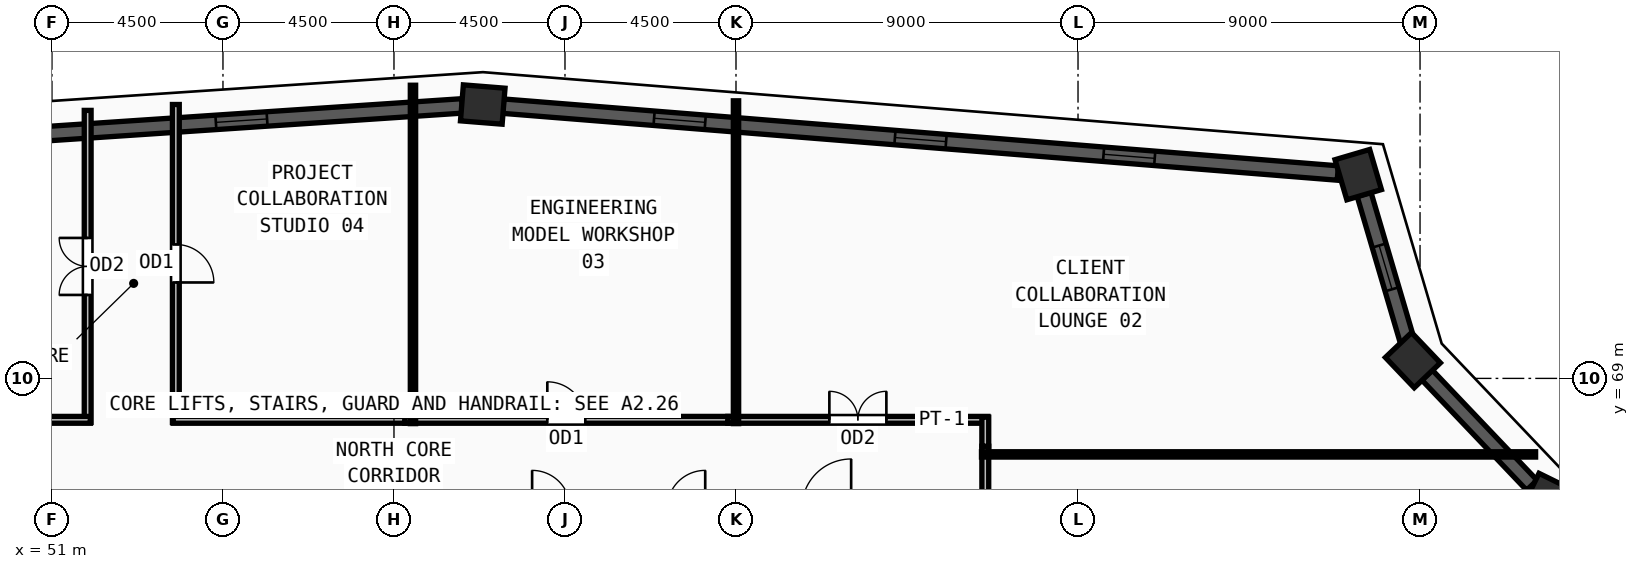
"""IFC4 building model, lengths in metres.
Left out: names, types, materials, properties, quantities, classifications, styles, units other than length and angle.
Written with IfcOpenShell. Run it as: python <this file> out.ifc"""

import sys

from ifc_helpers import new_model, si_unit, direction, frame, frame_2d, origin, origin_2d, place, context, subcontext, project, spatial, rectangle, extrude, source, transform, mapped, element, fill, save


model = new_model("IFC4")
c1 = context("Model", 3, precision=1e-05, world=origin(), true_north=direction((0.0, 1.0)))
c2 = subcontext(c1, "Body", "Model", "MODEL_VIEW")
j1 = project(units=[si_unit("LENGTHUNIT", "METRE"), si_unit("PLANEANGLEUNIT", "RADIAN")], contexts=[c1])
p1 = place(None, origin())
s1 = spatial("IfcSite", under=j1, at=p1, CompositionType="ELEMENT")
p2 = place(p1, origin())
s2 = spatial("IfcBuilding", under=s1, at=p2, CompositionType="ELEMENT")
p3 = place(p2, frame((0.0, 0.0, 297.75)))
s3 = spatial("IfcBuildingStorey", under=s2, at=p3, CompositionType="ELEMENT", Elevation=297.75)
m1 = source(origin(), c2, "Body", "SweptSolid", [
    extrude(rectangle(XDim=1.1, YDim=0.95, at=origin_2d()), origin(), (0.0, 0.0, 1.0), 3.75),
])
for number, where, z_axis, x_axis in (
    (1, (62.336, 76.206, 0.0), (0.0, 0.0, 1.0), (-0.997, 0.08, 0.0)),
    (2, (85.374, 74.361, 0.0), (0.0, 0.0, 1.0), (-0.283, 0.959, 0.0)),
    (3, (86.812, 69.48, 0.0), (0.0, 0.0, 1.0), (-0.689, 0.724, 0.0)),
    (4, (90.314, 65.799, 0.0), (0.0, 0.0, 1.0), (0.441, 0.897, 0.0)),
):
    element("IfcColumn", number, at=place(p3, frame(where, z_axis=z_axis, x_axis=x_axis)), inside=s3, PredefinedType="COLUMN", context=c2, shape_type="MappedRepresentation", body=[
        mapped(m1, transform((0.0, 0.0, 0.0), x_axis=(1.0, 0.0, 0.0), y_axis=(0.0, 1.0, 0.0), z_axis=(0.0, 0.0, 1.0), scale=1.0)),
    ])
p4 = place(p3, frame((89.942, 66.19, 0.0), z_axis=(0.0, 0.0, 1.0), x_axis=(-0.689222359841, 0.724549886961, 0.0)))
e5 = element("IfcWall", 5, at=p4, inside=s3, PredefinedType="SOLIDWALL", context=c2, shape_type="SweptSolid", body=[
    extrude(rectangle(XDim=4.001, YDim=0.38, at=frame_2d((2.0, 0.0))), origin(), (0.0, 0.0, 1.0), 3.57),
])
p5 = place(p3, frame((86.659, 69.998, 0.0), z_axis=(0.0, 0.0, 1.0), x_axis=(-0.2823872674, 0.959300490571, 0.0)))
e6 = element("IfcWall", 6, at=p5, inside=s3, PredefinedType="SOLIDWALL", context=c2, shape_type="SweptSolid", body=[
    extrude(rectangle(XDim=4.008, YDim=0.38, at=frame_2d((2.004, 0.0))), origin(), (0.0, 0.0, 1.0), 3.57),
])
m2 = source(origin(), c2, "Body", "SweptSolid", [
    extrude(rectangle(XDim=1.2, YDim=1.9, at=frame_2d((0.6, 0.95))), frame((0.0, 0.2, 0.0), z_axis=(0.0, -1.0, 0.0), x_axis=(1.0, 0.0, 0.0)), (0.0, 0.0, 1.0), 0.4),
])
p6 = place(p5, frame((1.404, 0.0, 0.55)))
e7 = element("IfcOpeningElement", 7, at=p6, cuts=e6, PredefinedType="OPENING", context=c2, shape_type="MappedRepresentation", body=[
    mapped(m2, transform((0.0, 0.0, 0.0), x_axis=(1.0, 0.0, 0.0), y_axis=(0.0, 1.0, 0.0), z_axis=(0.0, 0.0, 1.0), scale=1.0)),
])
p7 = place(p3, frame((84.836, 74.404, 0.0), z_axis=(0.0, 0.0, 1.0), x_axis=(-0.996807769303, 0.079839032169, 0.0)))
e8 = element("IfcWall", 8, at=p7, inside=s3, PredefinedType="SOLIDWALL", context=c2, shape_type="SweptSolid", body=[
    extrude(rectangle(XDim=22.032, YDim=0.38, at=frame_2d((11.016, 0.0))), origin(), (0.0, 0.0, 1.0), 3.57),
])
m3 = source(origin(), c2, "Body", "SweptSolid", [
    extrude(rectangle(XDim=1.35, YDim=1.85, at=frame_2d((0.675, 0.925))), frame((0.0, 0.2, 0.0), z_axis=(0.0, -1.0, 0.0), x_axis=(1.0, 0.0, 0.0)), (0.0, 0.0, 1.0), 0.4),
])
p8 = place(p7, frame((4.833, 0.0, 0.55)))
e9 = element("IfcOpeningElement", 9, at=p8, cuts=e8, PredefinedType="OPENING", context=c2, shape_type="MappedRepresentation", body=[
    mapped(m3, transform((0.0, 0.0, 0.0), x_axis=(1.0, 0.0, 0.0), y_axis=(0.0, 1.0, 0.0), z_axis=(0.0, 0.0, 1.0), scale=1.0)),
])
p9 = place(p7, frame((10.341, 0.0, 0.55)))
e10 = element("IfcOpeningElement", 10, at=p9, cuts=e8, PredefinedType="OPENING", context=c2, shape_type="MappedRepresentation", body=[
    mapped(m3, transform((0.0, 0.0, 0.0), x_axis=(1.0, 0.0, 0.0), y_axis=(0.0, 1.0, 0.0), z_axis=(0.0, 0.0, 1.0), scale=1.0)),
])
p10 = place(p7, frame((16.699, 0.0, 0.55)))
e11 = element("IfcOpeningElement", 11, at=p10, cuts=e8, PredefinedType="OPENING", context=c2, shape_type="MappedRepresentation", body=[
    mapped(m3, transform((0.0, 0.0, 0.0), x_axis=(1.0, 0.0, 0.0), y_axis=(0.0, 1.0, 0.0), z_axis=(0.0, 0.0, 1.0), scale=1.0)),
])
p11 = place(p3, frame((61.797, 76.17, 0.0), z_axis=(0.0, 0.0, 1.0), x_axis=(-0.99777170169, -0.066720546358, 0.0)))
e12 = element("IfcWall", 12, at=p11, inside=s3, PredefinedType="SOLIDWALL", context=c2, shape_type="SweptSolid", body=[
    extrude(rectangle(XDim=26.694, YDim=0.38, at=frame_2d((13.347, 0.0))), origin(), (0.0, 0.0, 1.0), 3.57),
])
p12 = place(p11, frame((5.148, 0.0, 0.55)))
e13 = element("IfcOpeningElement", 13, at=p12, cuts=e12, PredefinedType="OPENING", context=c2, shape_type="MappedRepresentation", body=[
    mapped(m3, transform((0.0, 0.0, 0.0), x_axis=(1.0, 0.0, 0.0), y_axis=(0.0, 1.0, 0.0), z_axis=(0.0, 0.0, 1.0), scale=1.0)),
])
p13 = place(p11, frame((12.672, 0.0, 0.55)))
e14 = element("IfcOpeningElement", 14, at=p13, cuts=e12, PredefinedType="OPENING", context=c2, shape_type="MappedRepresentation", body=[
    mapped(m3, transform((0.0, 0.0, 0.0), x_axis=(1.0, 0.0, 0.0), y_axis=(0.0, 1.0, 0.0), z_axis=(0.0, 0.0, 1.0), scale=1.0)),
])
p14 = place(p11, frame((19.345, 0.0, 0.55)))
e15 = element("IfcOpeningElement", 15, at=p14, cuts=e12, PredefinedType="OPENING", context=c2, shape_type="MappedRepresentation", body=[
    mapped(m3, transform((0.0, 0.0, 0.0), x_axis=(1.0, 0.0, 0.0), y_axis=(0.0, 1.0, 0.0), z_axis=(0.0, 0.0, 1.0), scale=1.0)),
])
p15 = place(p3, frame((68.785, 67.91, 0.0), z_axis=(0.0, 0.0, 1.0), x_axis=(1.0, 0.0, 0.0)))
e16 = element("IfcWall", 16, at=p15, inside=s3, PredefinedType="PARTITIONING", context=c2, shape_type="SweptSolid", body=[
    extrude(rectangle(XDim=6.845, YDim=0.18, at=frame_2d((3.422, 0.0))), origin(), (0.0, 0.0, 1.0), 3.57),
])
m4 = source(origin(), c2, "Body", "SweptSolid", [
    extrude(rectangle(XDim=1.5, YDim=2.2, at=frame_2d((0.75, 1.1))), frame((0.0, 0.1, 0.0), z_axis=(0.0, -1.0, 0.0), x_axis=(1.0, 0.0, 0.0)), (0.0, 0.0, 1.0), 0.2),
])
p16 = place(p15, frame((2.672, 0.0, 0.0)))
e17 = element("IfcOpeningElement", 17, at=p16, cuts=e16, PredefinedType="OPENING", context=c2, shape_type="MappedRepresentation", body=[
    mapped(m4, transform((0.0, 0.0, 0.0), x_axis=(1.0, 0.0, 0.0), y_axis=(0.0, 1.0, 0.0), z_axis=(0.0, 0.0, 1.0), scale=1.0)),
])
p17 = place(p3, frame((60.285, 67.91, 0.0), z_axis=(0.0, 0.0, 1.0), x_axis=(1.0, 0.0, 0.0)))
e18 = element("IfcWall", 18, at=p17, inside=s3, PredefinedType="PARTITIONING", context=c2, shape_type="SweptSolid", body=[
    extrude(rectangle(XDim=8.5, YDim=0.18, at=frame_2d((4.25, 0.0))), origin(), (0.0, 0.0, 1.0), 3.261),
])
m5 = source(origin(), c2, "Body", "SweptSolid", [
    extrude(rectangle(XDim=1.0, YDim=2.2, at=frame_2d((0.5, 1.1))), frame((0.0, 0.1, 0.0), z_axis=(0.0, -1.0, 0.0), x_axis=(1.0, 0.0, 0.0)), (0.0, 0.0, 1.0), 0.2),
])
p18 = place(p17, frame((3.75, 0.0, 0.0)))
e19 = element("IfcOpeningElement", 19, at=p18, cuts=e18, PredefinedType="OPENING", context=c2, shape_type="MappedRepresentation", body=[
    mapped(m5, transform((0.0, 0.0, 0.0), x_axis=(1.0, 0.0, 0.0), y_axis=(0.0, 1.0, 0.0), z_axis=(0.0, 0.0, 1.0), scale=1.0)),
])
p19 = place(p3, frame((54.26, 76.207, 0.0), z_axis=(0.0, 0.0, 1.0), x_axis=(0.0, -1.0, 0.0)))
e20 = element("IfcWall", 20, at=p19, inside=s3, PredefinedType="PARTITIONING", context=c2, shape_type="SweptSolid", body=[
    extrude(rectangle(XDim=8.367, YDim=0.18, at=frame_2d((4.184, 0.0))), origin(), (0.0, 0.0, 1.0), 3.57),
])
p20 = place(p19, frame((3.683, 0.0, 0.0)))
e21 = element("IfcOpeningElement", 21, at=p20, cuts=e20, PredefinedType="OPENING", context=c2, shape_type="MappedRepresentation", body=[
    mapped(m5, transform((0.0, 0.0, 0.0), x_axis=(1.0, 0.0, 0.0), y_axis=(0.0, 1.0, 0.0), z_axis=(0.0, 0.0, 1.0), scale=1.0)),
])
p21 = place(p3, frame((51.94, 67.84, 0.0), z_axis=(0.0, 0.0, 1.0), x_axis=(0.0, 1.0, 0.0)))
e22 = element("IfcWall", 22, at=p21, inside=s3, PredefinedType="PARTITIONING", context=c2, shape_type="SweptSolid", body=[
    extrude(rectangle(XDim=8.212, YDim=0.18, at=frame_2d((4.106, 0.0))), origin(), (0.0, 0.0, 1.0), 3.57),
])
p22 = place(p21, frame((3.356, 0.0, 0.0)))
e23 = element("IfcOpeningElement", 23, at=p22, cuts=e22, PredefinedType="OPENING", context=c2, shape_type="MappedRepresentation", body=[
    mapped(m4, transform((0.0, 0.0, 0.0), x_axis=(1.0, 0.0, 0.0), y_axis=(0.0, 1.0, 0.0), z_axis=(0.0, 0.0, 1.0), scale=1.0)),
])
p23 = place(p3, frame((75.56, 67.215, 0.0), z_axis=(0.0, 0.0, 1.0), x_axis=(0.0, -1.0, 0.0)))
e24 = element("IfcWall", 24, at=p23, inside=s3, PredefinedType="PARTITIONING", context=c2, shape_type="SweptSolid", body=[
    extrude(rectangle(XDim=2.235, YDim=0.18, at=frame_2d((1.118, 0.0))), origin(), (0.0, 0.0, 1.0), 3.57),
])
p24 = place(p3, frame((75.56, 67.98, 0.0), z_axis=(0.0, 0.0, 1.0), x_axis=(0.0, -1.0, 0.0)))
e25 = element("IfcWall", 25, at=p24, inside=s3, PredefinedType="PARTITIONING", context=c2, shape_type="SweptSolid", body=[
    extrude(rectangle(XDim=0.765, YDim=0.18, at=frame_2d((0.382, 0.0))), origin(), (0.0, 0.0, 1.0), 3.57),
])
p25 = place(p3, frame((54.19, 67.91, 0.0), z_axis=(0.0, 0.0, 1.0), x_axis=(1.0, 0.0, 0.0)))
e26 = element("IfcWall", 26, at=p25, inside=s3, PredefinedType="PARTITIONING", context=c2, shape_type="SweptSolid", body=[
    extrude(rectangle(XDim=6.095, YDim=0.18, at=frame_2d((3.047, 0.0))), origin(), (0.0, 0.0, 1.0), 3.57),
])
p26 = place(p3, frame((44.37, 67.91, 0.0), z_axis=(0.0, 0.0, 1.0), x_axis=(1.0, 0.0, 0.0)))
e27 = element("IfcWall", 27, at=p26, inside=s3, PredefinedType="PARTITIONING", context=c2, shape_type="SweptSolid", body=[
    extrude(rectangle(XDim=7.64, YDim=0.18, at=frame_2d((3.82, 0.0))), origin(), (0.0, 0.0, 1.0), 3.57),
])
p27 = place(p3, frame((75.46, 67.0, 0.0), z_axis=(0.0, 0.0, 1.0), x_axis=(1.0, 0.0, 0.0)))
e28 = element("IfcWall", 28, at=p27, inside=s3, PredefinedType="PARTITIONING", context=c2, shape_type="SweptSolid", body=[
    extrude(rectangle(XDim=14.581, YDim=0.14, at=frame_2d((7.291, 0.0))), origin(), (0.0, 0.0, 1.0), 3.57),
])
p28 = place(p3, frame((60.5, 67.81, 0.0), z_axis=(0.0, 0.0, 1.0), x_axis=(0.0, 1.0, 0.0)))
e29 = element("IfcWall", 29, at=p28, inside=s3, PredefinedType="PARTITIONING", context=c2, shape_type="SweptSolid", body=[
    extrude(rectangle(XDim=8.904, YDim=0.14, at=frame_2d((4.452, 0.0))), origin(), (0.0, 0.0, 1.0), 3.57),
])
p29 = place(p3, frame((69.0, 67.81, 0.0), z_axis=(0.0, 0.0, 1.0), x_axis=(0.0, 1.0, 0.0)))
e30 = element("IfcWall", 30, at=p29, inside=s3, PredefinedType="PARTITIONING", context=c2, shape_type="SweptSolid", body=[
    extrude(rectangle(XDim=8.494, YDim=0.14, at=frame_2d((4.247, 0.0))), origin(), (0.0, 0.0, 1.0), 3.57),
])
m6 = source(origin(), c2, "Body", "SweptSolid", [
    extrude(rectangle(XDim=1.2, YDim=1.9, at=frame_2d((0.6, 0.95))), frame((0.0, 0.03, 0.0), z_axis=(0.0, -1.0, 0.0), x_axis=(1.0, 0.0, 0.0)), (0.0, 0.0, 1.0), 0.06),
])
p30 = place(p6, origin())
e31 = element("IfcWindow", 31, at=p30, inside=s3, PartitioningType="SINGLE_PANEL", PredefinedType="WINDOW", context=c2, shape_type="MappedRepresentation", body=[
    mapped(m6, transform((0.0, 0.0, 0.0), x_axis=(1.0, 0.0, 0.0), y_axis=(0.0, 1.0, 0.0), z_axis=(0.0, 0.0, 1.0), scale=1.0)),
])
fill(e7, e31)
m7 = source(origin(), c2, "Body", "SweptSolid", [
    extrude(rectangle(XDim=1.35, YDim=1.85, at=frame_2d((0.675, 0.925))), frame((0.0, 0.03, 0.0), z_axis=(0.0, -1.0, 0.0), x_axis=(1.0, 0.0, 0.0)), (0.0, 0.0, 1.0), 0.06),
])
p31 = place(p8, origin())
e32 = element("IfcWindow", 32, at=p31, inside=s3, PartitioningType="SINGLE_PANEL", PredefinedType="WINDOW", context=c2, shape_type="MappedRepresentation", body=[
    mapped(m7, transform((0.0, 0.0, 0.0), x_axis=(1.0, 0.0, 0.0), y_axis=(0.0, 1.0, 0.0), z_axis=(0.0, 0.0, 1.0), scale=1.0)),
])
fill(e9, e32)
p32 = place(p9, origin())
e33 = element("IfcWindow", 33, at=p32, inside=s3, PartitioningType="SINGLE_PANEL", PredefinedType="WINDOW", context=c2, shape_type="MappedRepresentation", body=[
    mapped(m7, transform((0.0, 0.0, 0.0), x_axis=(1.0, 0.0, 0.0), y_axis=(0.0, 1.0, 0.0), z_axis=(0.0, 0.0, 1.0), scale=1.0)),
])
fill(e10, e33)
p33 = place(p10, origin())
e34 = element("IfcWindow", 34, at=p33, inside=s3, PartitioningType="SINGLE_PANEL", PredefinedType="WINDOW", context=c2, shape_type="MappedRepresentation", body=[
    mapped(m7, transform((0.0, 0.0, 0.0), x_axis=(1.0, 0.0, 0.0), y_axis=(0.0, 1.0, 0.0), z_axis=(0.0, 0.0, 1.0), scale=1.0)),
])
fill(e11, e34)
p34 = place(p12, origin())
e35 = element("IfcWindow", 35, at=p34, inside=s3, PartitioningType="SINGLE_PANEL", PredefinedType="WINDOW", context=c2, shape_type="MappedRepresentation", body=[
    mapped(m7, transform((0.0, 0.0, 0.0), x_axis=(1.0, 0.0, 0.0), y_axis=(0.0, 1.0, 0.0), z_axis=(0.0, 0.0, 1.0), scale=1.0)),
])
fill(e13, e35)
m8 = source(origin(), c2, "Body", "SweptSolid", [
    extrude(rectangle(XDim=1.5, YDim=2.2, at=frame_2d((0.75, 1.1))), frame((0.0, 0.025, 0.0), z_axis=(0.0, -1.0, 0.0), x_axis=(1.0, 0.0, 0.0)), (0.0, 0.0, 1.0), 0.05),
])
p35 = place(p16, origin())
e36 = element("IfcDoor", 36, at=p35, inside=s3, OperationType="DOUBLE_DOOR_SINGLE_SWING", PredefinedType="DOOR", context=c2, shape_type="MappedRepresentation", body=[
    mapped(m8, transform((0.0, 0.0, 0.0), x_axis=(1.0, 0.0, 0.0), y_axis=(0.0, 1.0, 0.0), z_axis=(0.0, 0.0, 1.0), scale=1.0)),
])
fill(e17, e36)
m9 = source(origin(), c2, "Body", "SweptSolid", [
    extrude(rectangle(XDim=1.0, YDim=2.2, at=frame_2d((0.5, 1.1))), frame((0.0, 0.025, 0.0), z_axis=(0.0, -1.0, 0.0), x_axis=(1.0, 0.0, 0.0)), (0.0, 0.0, 1.0), 0.05),
])
p36 = place(p18, origin())
e37 = element("IfcDoor", 37, at=p36, inside=s3, OperationType="SINGLE_SWING_LEFT", PredefinedType="DOOR", context=c2, shape_type="MappedRepresentation", body=[
    mapped(m9, transform((0.0, 0.0, 0.0), x_axis=(1.0, 0.0, 0.0), y_axis=(0.0, 1.0, 0.0), z_axis=(0.0, 0.0, 1.0), scale=1.0)),
])
fill(e19, e37)
p37 = place(p20, origin())
e38 = element("IfcDoor", 38, at=p37, inside=s3, OperationType="SINGLE_SWING_RIGHT", PredefinedType="DOOR", context=c2, shape_type="MappedRepresentation", body=[
    mapped(m9, transform((0.0, 0.0, 0.0), x_axis=(1.0, 0.0, 0.0), y_axis=(0.0, 1.0, 0.0), z_axis=(0.0, 0.0, 1.0), scale=1.0)),
])
fill(e21, e38)
p38 = place(p22, origin())
e39 = element("IfcDoor", 39, at=p38, inside=s3, OperationType="DOUBLE_DOOR_SINGLE_SWING", PredefinedType="DOOR", context=c2, shape_type="MappedRepresentation", body=[
    mapped(m8, transform((0.0, 0.0, 0.0), x_axis=(1.0, 0.0, 0.0), y_axis=(0.0, 1.0, 0.0), z_axis=(0.0, 0.0, 1.0), scale=1.0)),
])
fill(e23, e39)
save(model, sys.argv[1])
